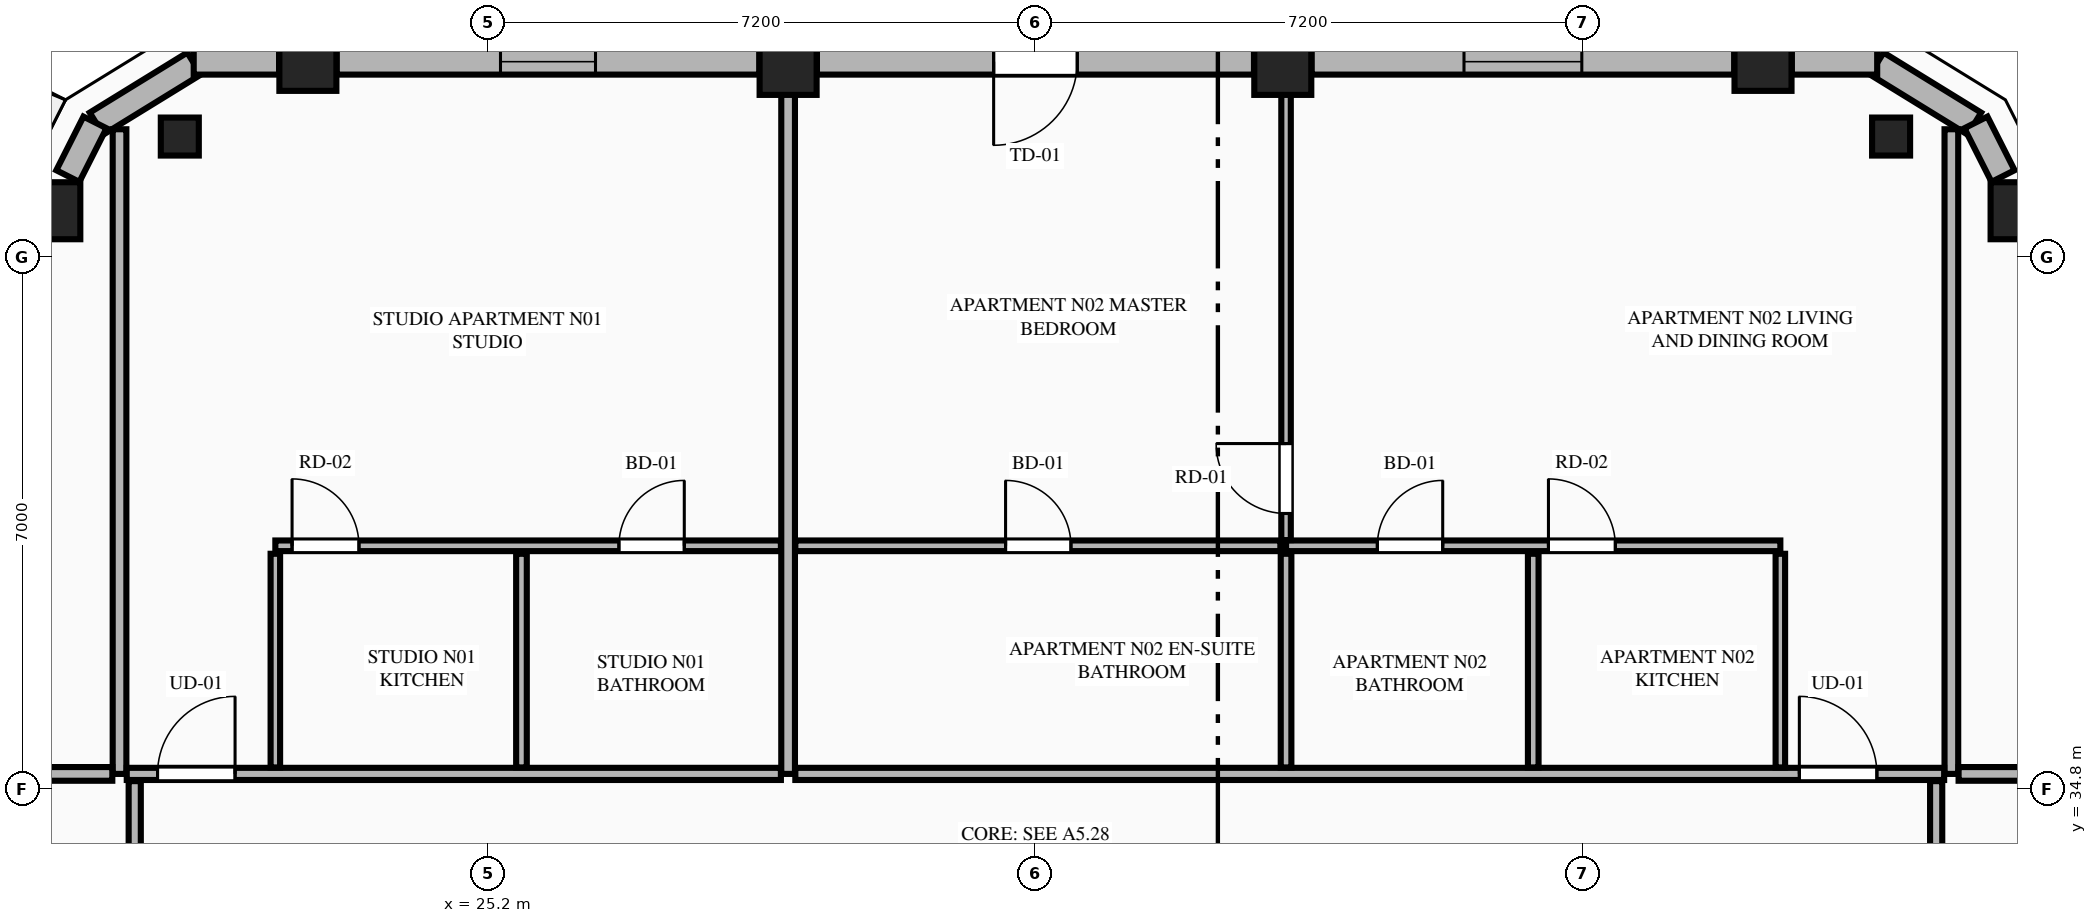
"""IFC4 building model, lengths in metres.
Left out: names, types, materials, properties, quantities, classifications, styles, units other than length and angle.
Written with IfcOpenShell. Run it as: python <this file> out.ifc"""

import sys

from ifc_helpers import new_model, si_unit, direction, frame, frame_2d, origin, origin_2d, place, context, subcontext, project, spatial, rectangle, extrude, element, fill, save


model = new_model("IFC4")
c1 = context("Model", 3, precision=1e-05, world=origin(), true_north=direction((0.0, 1.0)))
c2 = subcontext(c1, "Body", "Model", "MODEL_VIEW")
j1 = project(units=[si_unit("LENGTHUNIT", "METRE"), si_unit("PLANEANGLEUNIT", "RADIAN")], contexts=[c1])
p1 = place(None, origin())
s1 = spatial("IfcSite", under=j1, at=p1, CompositionType="ELEMENT")
p2 = place(p1, origin())
s2 = spatial("IfcBuilding", under=s1, at=p2, CompositionType="ELEMENT")
p3 = place(p2, frame((0.0, 0.0, 230.65)))
s3 = spatial("IfcBuildingStorey", under=s2, at=p3, CompositionType="ELEMENT", Elevation=230.65)
for number, where, z_axis, x_axis in (
    (1, (45.341, 42.409, 0.0), (0.0, 0.0, 1.0), (1.0, 0.0, 0.0)),
    (2, (41.972, 44.361, 0.0), (0.0, 0.0, 1.0), (1.0, 0.0, 0.0)),
    (3, (35.654, 44.308, 0.0), (0.0, 0.0, 1.0), (1.0, 0.0, 0.0)),
    (4, (29.146, 44.308, 0.0), (0.0, 0.0, 1.0), (1.0, 0.0, 0.0)),
    (5, (22.828, 44.361, 0.0), (0.0, 0.0, 1.0), (1.0, 0.0, 0.0)),
    (6, (19.459, 42.409, 0.0), (0.0, 0.0, 1.0), (1.0, 0.0, 0.0)),
):
    element("IfcColumn", number, at=place(p3, frame(where, z_axis=z_axis, x_axis=x_axis)), inside=s3, PredefinedType="COLUMN", context=c2, shape_type="SweptSolid", body=[
        extrude(rectangle(XDim=0.75, YDim=0.75, at=origin_2d()), origin(), (0.0, 0.0, 1.0), 3.65),
    ])
for number, where, z_axis, x_axis in (
    (7, (43.657, 43.385, 0.0), (0.0, 0.0, 1.0), (-0.865, 0.501, 0.0)),
    (8, (21.143, 43.385, 0.0), (0.0, 0.0, 1.0), (-0.865, -0.501, 0.0)),
):
    element("IfcColumn", number, at=place(p3, frame(where, z_axis=z_axis, x_axis=x_axis)), inside=s3, PredefinedType="PILASTER", context=c2, shape_type="SweptSolid", body=[
        extrude(rectangle(XDim=0.5, YDim=0.35, at=origin_2d()), origin(), (0.0, 0.0, 1.0), 3.65),
    ])
for number, where, z_axis, x_axis in (
    (9, (44.753, 43.555, 0.0), (0.0, 0.0, 1.0), (-0.852, 0.524, 0.0)),
    (10, (21.331, 44.345, 0.0), (0.0, 0.0, 1.0), (-0.852, -0.524, 0.0)),
):
    element("IfcWall", number, at=place(p3, frame(where, z_axis=z_axis, x_axis=x_axis)), inside=s3, PredefinedType="STANDARD", context=c2, shape_type="SweptSolid", body=[
        extrude(rectangle(XDim=1.508, YDim=0.34, at=frame_2d((0.754, 0.0))), origin(), (0.0, 0.0, 1.0), 3.45),
    ])
p4 = place(p3, frame((45.13, 42.865, 0.0), z_axis=(0.0, 0.0, 1.0), x_axis=(-0.451159191899, 0.892443490404, 0.0)))
e11 = element("IfcWall", 11, at=p4, inside=s3, PredefinedType="STANDARD", context=c2, shape_type="SweptSolid", body=[
    extrude(rectangle(XDim=0.791, YDim=0.34, at=frame_2d((0.396, 0.0))), origin(), (0.0, 0.0, 1.0), 3.45),
])
p5 = place(p3, frame((43.474, 44.37, 0.0), z_axis=(0.0, 0.0, 1.0), x_axis=(-1.0, 0.0, 0.0)))
e12 = element("IfcWall", 12, at=p5, inside=s3, PredefinedType="STANDARD", context=c2, shape_type="SweptSolid", body=[
    extrude(rectangle(XDim=1.123, YDim=0.34, at=frame_2d((0.562, 0.0))), origin(), (0.0, 0.0, 1.0), 3.45),
])
p6 = place(p3, frame((41.593, 44.37, 0.0), z_axis=(0.0, 0.0, 1.0), x_axis=(-1.0, 0.0, 0.0)))
e13 = element("IfcWall", 13, at=p6, inside=s3, PredefinedType="STANDARD", context=c2, shape_type="SweptSolid", body=[
    extrude(rectangle(XDim=5.56, YDim=0.34, at=frame_2d((2.78, 0.0))), origin(), (0.0, 0.0, 1.0), 2.983),
])
p7 = place(p6, frame((2.005, 0.0, 0.75)))
e14 = element("IfcOpeningElement", 14, at=p7, cuts=e13, PredefinedType="OPENING", context=c2, shape_type="SweptSolid", body=[
    extrude(rectangle(XDim=1.55, YDim=2.05, at=frame_2d((0.775, 1.025))), frame((0.0, 0.18, 0.0), z_axis=(0.0, -1.0, 0.0), x_axis=(1.0, 0.0, 0.0)), (0.0, 0.0, 1.0), 0.36),
])
p8 = place(p3, frame((35.275, 44.37, 0.0), z_axis=(0.0, 0.0, 1.0), x_axis=(-1.0, 0.0, 0.0)))
e15 = element("IfcWall", 15, at=p8, inside=s3, PredefinedType="STANDARD", context=c2, shape_type="SweptSolid", body=[
    extrude(rectangle(XDim=5.75, YDim=0.34, at=frame_2d((2.875, 0.0))), origin(), (0.0, 0.0, 1.0), 2.983),
])
p9 = place(p8, frame((2.325, 0.0, 0.0)))
e16 = element("IfcOpeningElement", 16, at=p9, cuts=e15, PredefinedType="OPENING", context=c2, shape_type="SweptSolid", body=[
    extrude(rectangle(XDim=1.1, YDim=2.25, at=frame_2d((0.55, 1.125))), frame((0.0, 0.18, 0.0), z_axis=(0.0, -1.0, 0.0), x_axis=(1.0, 0.0, 0.0)), (0.0, 0.0, 1.0), 0.36),
])
p10 = place(p3, frame((28.767, 44.37, 0.0), z_axis=(0.0, 0.0, 1.0), x_axis=(-1.0, 0.0, 0.0)))
e17 = element("IfcWall", 17, at=p10, inside=s3, PredefinedType="STANDARD", context=c2, shape_type="SweptSolid", body=[
    extrude(rectangle(XDim=5.56, YDim=0.34, at=frame_2d((2.78, 0.0))), origin(), (0.0, 0.0, 1.0), 2.983),
])
p11 = place(p10, frame((2.155, 0.0, 0.75)))
e18 = element("IfcOpeningElement", 18, at=p11, cuts=e17, PredefinedType="OPENING", context=c2, shape_type="SweptSolid", body=[
    extrude(rectangle(XDim=1.25, YDim=1.95, at=frame_2d((0.625, 0.975))), frame((0.0, 0.18, 0.0), z_axis=(0.0, -1.0, 0.0), x_axis=(1.0, 0.0, 0.0)), (0.0, 0.0, 1.0), 0.36),
])
p12 = place(p3, frame((22.449, 44.37, 0.0), z_axis=(0.0, 0.0, 1.0), x_axis=(-1.0, 0.0, 0.0)))
e19 = element("IfcWall", 19, at=p12, inside=s3, PredefinedType="STANDARD", context=c2, shape_type="SweptSolid", body=[
    extrude(rectangle(XDim=1.123, YDim=0.34, at=frame_2d((0.562, 0.0))), origin(), (0.0, 0.0, 1.0), 3.45),
])
p13 = place(p3, frame((20.027, 43.571, 0.0), z_axis=(0.0, 0.0, 1.0), x_axis=(-0.451404919072, -0.89231922485, 0.0)))
e20 = element("IfcWall", 20, at=p13, inside=s3, PredefinedType="STANDARD", context=c2, shape_type="SweptSolid", body=[
    extrude(rectangle(XDim=0.791, YDim=0.34, at=frame_2d((0.396, 0.0))), origin(), (0.0, 0.0, 1.0), 3.45),
])
p14 = place(p3, frame((20.35, 35.0, 0.0), z_axis=(0.0, 0.0, 1.0), x_axis=(0.0, 1.0, 0.0)))
e21 = element("IfcWall", 21, at=p14, inside=s3, PredefinedType="PARTITIONING", context=c2, shape_type="SweptSolid", body=[
    extrude(rectangle(XDim=8.481, YDim=0.18, at=frame_2d((4.24, 0.0))), origin(), (0.0, 0.0, 1.0), 3.45),
])
p15 = place(p3, frame((29.146, 35.0, 0.0), z_axis=(0.0, 0.0, 1.0), x_axis=(0.0, 1.0, 0.0)))
e22 = element("IfcWall", 22, at=p15, inside=s3, PredefinedType="PARTITIONING", context=c2, shape_type="SweptSolid", body=[
    extrude(rectangle(XDim=9.195, YDim=0.18, at=frame_2d((4.598, 0.0))), origin(), (0.0, 0.0, 1.0), 2.907),
])
p16 = place(p3, frame((44.45, 35.0, 0.0), z_axis=(0.0, 0.0, 1.0), x_axis=(0.0, 1.0, 0.0)))
e23 = element("IfcWall", 23, at=p16, inside=s3, PredefinedType="PARTITIONING", context=c2, shape_type="SweptSolid", body=[
    extrude(rectangle(XDim=8.481, YDim=0.18, at=frame_2d((4.24, 0.0))), origin(), (0.0, 0.0, 1.0), 3.45),
])
p17 = place(p3, frame((20.445, 35.0, 0.0), z_axis=(0.0, 0.0, 1.0), x_axis=(1.0, 0.0, 0.0)))
e24 = element("IfcWall", 24, at=p17, inside=s3, PredefinedType="PARTITIONING", context=c2, shape_type="SweptSolid", body=[
    extrude(rectangle(XDim=8.606, YDim=0.16, at=frame_2d((4.303, 0.0))), origin(), (0.0, 0.0, 1.0), 3.45),
])
p18 = place(p17, frame((0.405, 0.0, 0.0)))
e25 = element("IfcOpeningElement", 25, at=p18, cuts=e24, PredefinedType="OPENING", context=c2, shape_type="SweptSolid", body=[
    extrude(rectangle(XDim=1.02, YDim=2.25, at=frame_2d((0.51, 1.125))), frame((0.0, 0.09, 0.0), z_axis=(0.0, -1.0, 0.0), x_axis=(1.0, 0.0, 0.0)), (0.0, 0.0, 1.0), 0.18),
])
p19 = place(p3, frame((22.4, 35.085, 0.0), z_axis=(0.0, 0.0, 1.0), x_axis=(0.0, 1.0, 0.0)))
e26 = element("IfcWall", 26, at=p19, inside=s3, PredefinedType="PARTITIONING", context=c2, shape_type="SweptSolid", body=[
    extrude(rectangle(XDim=2.811, YDim=0.125, at=frame_2d((1.406, 0.0))), origin(), (0.0, 0.0, 1.0), 3.45),
])
p20 = place(p3, frame((22.4, 38.001, 0.0), z_axis=(0.0, 0.0, 1.0), x_axis=(1.0, 0.0, 0.0)))
e27 = element("IfcWall", 27, at=p20, inside=s3, PredefinedType="PLUMBINGWALL", context=c2, shape_type="SweptSolid", body=[
    extrude(rectangle(XDim=6.651, YDim=0.14, at=frame_2d((3.326, 0.0))), origin(), (0.0, 0.0, 1.0), 3.45),
])
p21 = place(p20, frame((4.52, 0.0, 0.0)))
e28 = element("IfcOpeningElement", 28, at=p21, cuts=e27, PredefinedType="OPENING", context=c2, shape_type="SweptSolid", body=[
    extrude(rectangle(XDim=0.86, YDim=2.1, at=frame_2d((0.43, 1.05))), frame((0.0, 0.08, 0.0), z_axis=(0.0, -1.0, 0.0), x_axis=(1.0, 0.0, 0.0)), (0.0, 0.0, 1.0), 0.16),
])
p22 = place(p20, frame((0.22, 0.0, 0.0)))
e29 = element("IfcOpeningElement", 29, at=p22, cuts=e27, PredefinedType="OPENING", context=c2, shape_type="SweptSolid", body=[
    extrude(rectangle(XDim=0.88, YDim=2.15, at=frame_2d((0.44, 1.075))), frame((0.0, 0.08, 0.0), z_axis=(0.0, -1.0, 0.0), x_axis=(1.0, 0.0, 0.0)), (0.0, 0.0, 1.0), 0.16),
])
p23 = place(p3, frame((25.638, 35.085, 0.0), z_axis=(0.0, 0.0, 1.0), x_axis=(0.0, 1.0, 0.0)))
e30 = element("IfcWall", 30, at=p23, inside=s3, PredefinedType="PLUMBINGWALL", context=c2, shape_type="SweptSolid", body=[
    extrude(rectangle(XDim=2.811, YDim=0.14, at=frame_2d((1.406, 0.0))), origin(), (0.0, 0.0, 1.0), 3.45),
])
p24 = place(p3, frame((29.241, 35.0, 0.0), z_axis=(0.0, 0.0, 1.0), x_axis=(1.0, 0.0, 0.0)))
e31 = element("IfcWall", 31, at=p24, inside=s3, PredefinedType="PARTITIONING", context=c2, shape_type="SweptSolid", body=[
    extrude(rectangle(XDim=15.114, YDim=0.16, at=frame_2d((7.557, 0.0))), origin(), (0.0, 0.0, 1.0), 3.45),
])
p25 = place(p24, frame((13.209, 0.0, 0.0)))
e32 = element("IfcOpeningElement", 32, at=p25, cuts=e31, PredefinedType="OPENING", context=c2, shape_type="SweptSolid", body=[
    extrude(rectangle(XDim=1.02, YDim=2.25, at=frame_2d((0.51, 1.125))), frame((0.0, 0.09, 0.0), z_axis=(0.0, -1.0, 0.0), x_axis=(1.0, 0.0, 0.0)), (0.0, 0.0, 1.0), 0.18),
])
p26 = place(p3, frame((42.2, 35.085, 0.0), z_axis=(0.0, 0.0, 1.0), x_axis=(0.0, 1.0, 0.0)))
e33 = element("IfcWall", 33, at=p26, inside=s3, PredefinedType="PARTITIONING", context=c2, shape_type="SweptSolid", body=[
    extrude(rectangle(XDim=2.811, YDim=0.125, at=frame_2d((1.406, 0.0))), origin(), (0.0, 0.0, 1.0), 3.45),
])
p27 = place(p3, frame((35.697, 38.001, 0.0), z_axis=(0.0, 0.0, 1.0), x_axis=(1.0, 0.0, 0.0)))
e34 = element("IfcWall", 34, at=p27, inside=s3, PredefinedType="PLUMBINGWALL", context=c2, shape_type="SweptSolid", body=[
    extrude(rectangle(XDim=6.503, YDim=0.14, at=frame_2d((3.251, 0.0))), origin(), (0.0, 0.0, 1.0), 3.45),
])
p28 = place(p27, frame((1.201, 0.0, 0.0)))
e35 = element("IfcOpeningElement", 35, at=p28, cuts=e34, PredefinedType="OPENING", context=c2, shape_type="SweptSolid", body=[
    extrude(rectangle(XDim=0.86, YDim=2.1, at=frame_2d((0.43, 1.05))), frame((0.0, 0.08, 0.0), z_axis=(0.0, -1.0, 0.0), x_axis=(1.0, 0.0, 0.0)), (0.0, 0.0, 1.0), 0.16),
])
p29 = place(p27, frame((3.452, 0.0, 0.0)))
e36 = element("IfcOpeningElement", 36, at=p29, cuts=e34, PredefinedType="OPENING", context=c2, shape_type="SweptSolid", body=[
    extrude(rectangle(XDim=0.88, YDim=2.15, at=frame_2d((0.44, 1.075))), frame((0.0, 0.08, 0.0), z_axis=(0.0, -1.0, 0.0), x_axis=(1.0, 0.0, 0.0)), (0.0, 0.0, 1.0), 0.16),
])
p30 = place(p3, frame((29.241, 38.001, 0.0), z_axis=(0.0, 0.0, 1.0), x_axis=(1.0, 0.0, 0.0)))
e37 = element("IfcWall", 37, at=p30, inside=s3, PredefinedType="PLUMBINGWALL", context=c2, shape_type="SweptSolid", body=[
    extrude(rectangle(XDim=6.381, YDim=0.14, at=frame_2d((3.19, 0.0))), origin(), (0.0, 0.0, 1.0), 3.45),
])
p31 = place(p30, frame((2.766, 0.0, 0.0)))
e38 = element("IfcOpeningElement", 38, at=p31, cuts=e37, PredefinedType="OPENING", context=c2, shape_type="SweptSolid", body=[
    extrude(rectangle(XDim=0.86, YDim=2.1, at=frame_2d((0.43, 1.05))), frame((0.0, 0.08, 0.0), z_axis=(0.0, -1.0, 0.0), x_axis=(1.0, 0.0, 0.0)), (0.0, 0.0, 1.0), 0.16),
])
p32 = place(p3, frame((38.949, 35.085, 0.0), z_axis=(0.0, 0.0, 1.0), x_axis=(0.0, 1.0, 0.0)))
e39 = element("IfcWall", 39, at=p32, inside=s3, PredefinedType="PLUMBINGWALL", context=c2, shape_type="SweptSolid", body=[
    extrude(rectangle(XDim=2.811, YDim=0.14, at=frame_2d((1.406, 0.0))), origin(), (0.0, 0.0, 1.0), 3.45),
])
p33 = place(p3, frame((35.697, 35.085, 0.0), z_axis=(0.0, 0.0, 1.0), x_axis=(0.0, 1.0, 0.0)))
e40 = element("IfcWall", 40, at=p33, inside=s3, PredefinedType="PLUMBINGWALL", context=c2, shape_type="SweptSolid", body=[
    extrude(rectangle(XDim=2.811, YDim=0.14, at=frame_2d((1.406, 0.0))), origin(), (0.0, 0.0, 1.0), 2.907),
])
p34 = place(p3, frame((35.697, 38.076, 0.0), z_axis=(0.0, 0.0, 1.0), x_axis=(0.0, 1.0, 0.0)))
e41 = element("IfcWall", 41, at=p34, inside=s3, PredefinedType="PARTITIONING", context=c2, shape_type="SweptSolid", body=[
    extrude(rectangle(XDim=6.209, YDim=0.125, at=frame_2d((3.104, 0.0))), origin(), (0.0, 0.0, 1.0), 2.907),
])
p35 = place(p34, frame((0.35, 0.0, 0.0)))
e42 = element("IfcOpeningElement", 42, at=p35, cuts=e41, PredefinedType="OPENING", context=c2, shape_type="SweptSolid", body=[
    extrude(rectangle(XDim=0.92, YDim=2.15, at=frame_2d((0.46, 1.075))), frame((0.0, 0.073, 0.0), z_axis=(0.0, -1.0, 0.0), x_axis=(1.0, 0.0, 0.0)), (0.0, 0.0, 1.0), 0.145),
])
p36 = place(p3, frame((15.933, 35.0, 0.0), z_axis=(0.0, 0.0, 1.0), x_axis=(1.0, 0.0, 0.0)))
e43 = element("IfcWall", 43, at=p36, inside=s3, PredefinedType="PARTITIONING", context=c2, shape_type="SweptSolid", body=[
    extrude(rectangle(XDim=4.322, YDim=0.18, at=frame_2d((2.161, 0.0))), origin(), (0.0, 0.0, 1.0), 3.45),
])
p37 = place(p3, frame((44.545, 35.0, 0.0), z_axis=(0.0, 0.0, 1.0), x_axis=(1.0, 0.0, 0.0)))
e44 = element("IfcWall", 44, at=p37, inside=s3, PredefinedType="PARTITIONING", context=c2, shape_type="SweptSolid", body=[
    extrude(rectangle(XDim=4.322, YDim=0.18, at=frame_2d((2.161, 0.0))), origin(), (0.0, 0.0, 1.0), 3.45),
])
p38 = place(p3, frame((20.55, 16.495, 0.0), z_axis=(0.0, 0.0, 1.0), x_axis=(0.0, 1.0, 0.0)))
e45 = element("IfcWall", 45, at=p38, inside=s3, PredefinedType="PARTITIONING", context=c2, shape_type="SweptSolid", body=[
    extrude(rectangle(XDim=18.41, YDim=0.16, at=frame_2d((9.205, 0.0))), origin(), (0.0, 0.0, 1.0), 3.137),
])
p39 = place(p38, frame((0.45, 0.0, 0.0)))
e46 = element("IfcOpeningElement", 46, at=p39, cuts=e45, PredefinedType="OPENING", context=c2, shape_type="SweptSolid", body=[
    extrude(rectangle(XDim=1.02, YDim=2.25, at=frame_2d((0.51, 1.125))), frame((0.0, 0.09, 0.0), z_axis=(0.0, -1.0, 0.0), x_axis=(1.0, 0.0, 0.0)), (0.0, 0.0, 1.0), 0.18),
])
p40 = place(p3, frame((44.25, 16.495, 0.0), z_axis=(0.0, 0.0, 1.0), x_axis=(0.0, 1.0, 0.0)))
e47 = element("IfcWall", 47, at=p40, inside=s3, PredefinedType="PARTITIONING", context=c2, shape_type="SweptSolid", body=[
    extrude(rectangle(XDim=18.41, YDim=0.16, at=frame_2d((9.205, 0.0))), origin(), (0.0, 0.0, 1.0), 3.137),
])
p41 = place(p40, frame((0.45, 0.0, 0.0)))
e48 = element("IfcOpeningElement", 48, at=p41, cuts=e47, PredefinedType="OPENING", context=c2, shape_type="SweptSolid", body=[
    extrude(rectangle(XDim=1.02, YDim=2.25, at=frame_2d((0.51, 1.125))), frame((0.0, 0.09, 0.0), z_axis=(0.0, -1.0, 0.0), x_axis=(1.0, 0.0, 0.0)), (0.0, 0.0, 1.0), 0.18),
])
p42 = place(p7, origin())
e49 = element("IfcWindow", 49, at=p42, inside=s3, PartitioningType="SINGLE_PANEL", PredefinedType="WINDOW", context=c2, shape_type="SweptSolid", body=[
    extrude(rectangle(XDim=1.55, YDim=2.05, at=frame_2d((0.775, 1.025))), frame((0.0, 0.03, 0.0), z_axis=(0.0, -1.0, 0.0), x_axis=(1.0, 0.0, 0.0)), (0.0, 0.0, 1.0), 0.06),
])
fill(e14, e49)
p43 = place(p9, origin())
e50 = element("IfcDoor", 50, at=p43, inside=s3, OperationType="SINGLE_SWING_RIGHT", PredefinedType="DOOR", context=c2, shape_type="SweptSolid", body=[
    extrude(rectangle(XDim=1.1, YDim=2.25, at=frame_2d((0.55, 1.125))), frame((0.0, 0.025, 0.0), z_axis=(0.0, -1.0, 0.0), x_axis=(1.0, 0.0, 0.0)), (0.0, 0.0, 1.0), 0.05),
])
fill(e16, e50)
p44 = place(p11, origin())
e51 = element("IfcWindow", 51, at=p44, inside=s3, PartitioningType="SINGLE_PANEL", PredefinedType="WINDOW", context=c2, shape_type="SweptSolid", body=[
    extrude(rectangle(XDim=1.25, YDim=1.95, at=frame_2d((0.625, 0.975))), frame((0.0, 0.03, 0.0), z_axis=(0.0, -1.0, 0.0), x_axis=(1.0, 0.0, 0.0)), (0.0, 0.0, 1.0), 0.06),
])
fill(e18, e51)
p45 = place(p21, origin())
e52 = element("IfcDoor", 52, at=p45, inside=s3, OperationType="SINGLE_SWING_RIGHT", PredefinedType="DOOR", context=c2, shape_type="SweptSolid", body=[
    extrude(rectangle(XDim=0.86, YDim=2.1, at=frame_2d((0.43, 1.05))), frame((0.0, 0.025, 0.0), z_axis=(0.0, -1.0, 0.0), x_axis=(1.0, 0.0, 0.0)), (0.0, 0.0, 1.0), 0.05),
])
fill(e28, e52)
p46 = place(p18, origin())
e53 = element("IfcDoor", 53, at=p46, inside=s3, OperationType="SINGLE_SWING_RIGHT", PredefinedType="DOOR", context=c2, shape_type="SweptSolid", body=[
    extrude(rectangle(XDim=1.02, YDim=2.25, at=frame_2d((0.51, 1.125))), frame((0.0, 0.025, 0.0), z_axis=(0.0, -1.0, 0.0), x_axis=(1.0, 0.0, 0.0)), (0.0, 0.0, 1.0), 0.05),
])
fill(e25, e53)
p47 = place(p22, origin())
e54 = element("IfcDoor", 54, at=p47, inside=s3, OperationType="SINGLE_SWING_LEFT", PredefinedType="DOOR", context=c2, shape_type="SweptSolid", body=[
    extrude(rectangle(XDim=0.88, YDim=2.15, at=frame_2d((0.44, 1.075))), frame((0.0, 0.025, 0.0), z_axis=(0.0, -1.0, 0.0), x_axis=(1.0, 0.0, 0.0)), (0.0, 0.0, 1.0), 0.05),
])
fill(e29, e54)
p48 = place(p28, origin())
e55 = element("IfcDoor", 55, at=p48, inside=s3, OperationType="SINGLE_SWING_RIGHT", PredefinedType="DOOR", context=c2, shape_type="SweptSolid", body=[
    extrude(rectangle(XDim=0.86, YDim=2.1, at=frame_2d((0.43, 1.05))), frame((0.0, 0.025, 0.0), z_axis=(0.0, -1.0, 0.0), x_axis=(1.0, 0.0, 0.0)), (0.0, 0.0, 1.0), 0.05),
])
fill(e35, e55)
p49 = place(p31, origin())
e56 = element("IfcDoor", 56, at=p49, inside=s3, OperationType="SINGLE_SWING_LEFT", PredefinedType="DOOR", context=c2, shape_type="SweptSolid", body=[
    extrude(rectangle(XDim=0.86, YDim=2.1, at=frame_2d((0.43, 1.05))), frame((0.0, 0.025, 0.0), z_axis=(0.0, -1.0, 0.0), x_axis=(1.0, 0.0, 0.0)), (0.0, 0.0, 1.0), 0.05),
])
fill(e38, e56)
p50 = place(p25, origin())
e57 = element("IfcDoor", 57, at=p50, inside=s3, OperationType="SINGLE_SWING_LEFT", PredefinedType="DOOR", context=c2, shape_type="SweptSolid", body=[
    extrude(rectangle(XDim=1.02, YDim=2.25, at=frame_2d((0.51, 1.125))), frame((0.0, 0.025, 0.0), z_axis=(0.0, -1.0, 0.0), x_axis=(1.0, 0.0, 0.0)), (0.0, 0.0, 1.0), 0.05),
])
fill(e32, e57)
p51 = place(p29, origin())
e58 = element("IfcDoor", 58, at=p51, inside=s3, OperationType="SINGLE_SWING_LEFT", PredefinedType="DOOR", context=c2, shape_type="SweptSolid", body=[
    extrude(rectangle(XDim=0.88, YDim=2.15, at=frame_2d((0.44, 1.075))), frame((0.0, 0.025, 0.0), z_axis=(0.0, -1.0, 0.0), x_axis=(1.0, 0.0, 0.0)), (0.0, 0.0, 1.0), 0.05),
])
fill(e36, e58)
p52 = place(p35, origin())
e59 = element("IfcDoor", 59, at=p52, inside=s3, OperationType="SINGLE_SWING_RIGHT", PredefinedType="DOOR", context=c2, shape_type="SweptSolid", body=[
    extrude(rectangle(XDim=0.92, YDim=2.15, at=frame_2d((0.46, 1.075))), frame((0.0, 0.025, 0.0), z_axis=(0.0, -1.0, 0.0), x_axis=(1.0, 0.0, 0.0)), (0.0, 0.0, 1.0), 0.05),
])
fill(e42, e59)
save(model, sys.argv[1])
